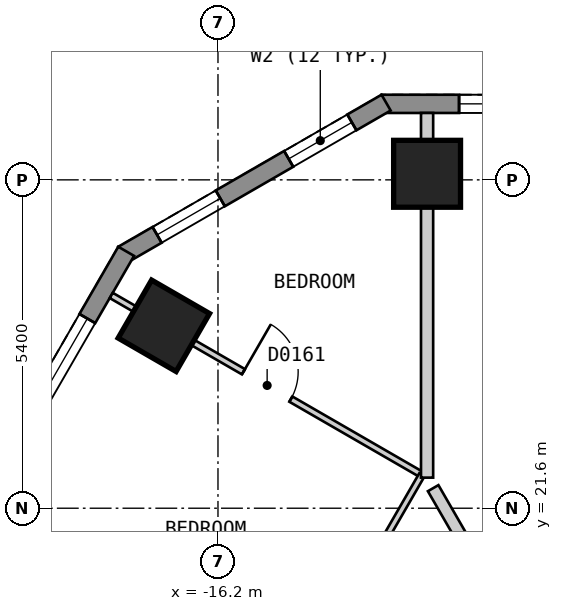
"""IFC4 building model, lengths in metres.
Left out: names, types, materials, properties, quantities, classifications, styles, units other than length and angle.
Written with IfcOpenShell. Run it as: python <this file> out.ifc"""

import sys

from ifc_helpers import new_model, si_unit, direction, frame, frame_2d, origin, origin_2d, place, context, subcontext, project, spatial, polyline, rectangle, outline, extrude, element, fill, save


model = new_model("IFC4")
c1 = context("Model", 3, precision=1e-05, world=origin(), true_north=direction((0.0, 1.0)))
c2 = subcontext(c1, "Body", "Model", "MODEL_VIEW")
j1 = project(units=[si_unit("LENGTHUNIT", "METRE"), si_unit("PLANEANGLEUNIT", "RADIAN")], contexts=[c1])
p1 = place(None, origin())
s1 = spatial("IfcSite", under=j1, at=p1, CompositionType="ELEMENT")
p2 = place(p1, origin())
s2 = spatial("IfcBuilding", under=s1, at=p2, CompositionType="ELEMENT")
p3 = place(p2, frame((0.0, 0.0, 23.4)))
s3 = spatial("IfcBuildingStorey", under=s2, at=p3, CompositionType="ELEMENT", Elevation=23.4)
for number, where, z_axis, x_axis in (
    (1, (-12.761, 27.1, 0.0), (0.0, 0.0, 1.0), (-1.0, 0.0, 0.0)),
    (2, (-17.09, 24.6, 0.0), (0.0, 0.0, 1.0), (-0.5, -0.866, 0.0)),
):
    element("IfcColumn", number, at=place(p3, frame(where, z_axis=z_axis, x_axis=x_axis)), inside=s3, PredefinedType="COLUMN", context=c2, shape_type="SweptSolid", body=[
        extrude(rectangle(XDim=1.1, YDim=1.1, at=origin_2d()), origin(), (0.0, 0.0, 1.0), 3.0),
    ])
p4 = place(p3, frame((13.51, 28.25, 0.0), z_axis=(0.0, 0.0, 1.0), x_axis=(-1.0, 0.0, 0.0)))
e3 = element("IfcWall", 3, at=p4, inside=s3, PredefinedType="SOLIDWALL", context=c2, shape_type="SweptSolid", body=[
    extrude(outline(polyline([(0.0, -0.15), (27.02, -0.15), (26.94, 0.15), (0.08, 0.15), (0.0, -0.15)])), origin(), (0.0, 0.0, 1.0), 2.7),
])
p5 = place(p4, frame((1.277, 0.0, 0.15)))
e4 = element("IfcOpeningElement", 4, at=p5, cuts=e3, PredefinedType="OPENING", context=c2, shape_type="SweptSolid", body=[
    extrude(rectangle(XDim=1.5, YDim=2.1, at=frame_2d((0.75, 1.05))), frame((0.0, 0.16, 0.0), z_axis=(0.0, -1.0, 0.0), x_axis=(1.0, 0.0, 0.0)), (0.0, 0.0, 1.0), 0.32),
])
p6 = place(p4, frame((3.829, 0.0, 0.15)))
e5 = element("IfcOpeningElement", 5, at=p6, cuts=e3, PredefinedType="OPENING", context=c2, shape_type="SweptSolid", body=[
    extrude(rectangle(XDim=1.5, YDim=2.1, at=frame_2d((0.75, 1.05))), frame((0.0, 0.16, 0.0), z_axis=(0.0, -1.0, 0.0), x_axis=(1.0, 0.0, 0.0)), (0.0, 0.0, 1.0), 0.32),
])
p7 = place(p4, frame((6.381, 0.0, 0.15)))
e6 = element("IfcOpeningElement", 6, at=p7, cuts=e3, PredefinedType="OPENING", context=c2, shape_type="SweptSolid", body=[
    extrude(rectangle(XDim=1.5, YDim=2.1, at=frame_2d((0.75, 1.05))), frame((0.0, 0.16, 0.0), z_axis=(0.0, -1.0, 0.0), x_axis=(1.0, 0.0, 0.0)), (0.0, 0.0, 1.0), 0.32),
])
p8 = place(p4, frame((8.933, 0.0, 0.15)))
e7 = element("IfcOpeningElement", 7, at=p8, cuts=e3, PredefinedType="OPENING", context=c2, shape_type="SweptSolid", body=[
    extrude(rectangle(XDim=1.5, YDim=2.1, at=frame_2d((0.75, 1.05))), frame((0.0, 0.16, 0.0), z_axis=(0.0, -1.0, 0.0), x_axis=(1.0, 0.0, 0.0)), (0.0, 0.0, 1.0), 0.32),
])
p9 = place(p4, frame((11.485, 0.0, 0.15)))
e8 = element("IfcOpeningElement", 8, at=p9, cuts=e3, PredefinedType="OPENING", context=c2, shape_type="SweptSolid", body=[
    extrude(rectangle(XDim=1.5, YDim=2.1, at=frame_2d((0.75, 1.05))), frame((0.0, 0.16, 0.0), z_axis=(0.0, -1.0, 0.0), x_axis=(1.0, 0.0, 0.0)), (0.0, 0.0, 1.0), 0.32),
])
p10 = place(p4, frame((14.037, 0.0, 0.15)))
e9 = element("IfcOpeningElement", 9, at=p10, cuts=e3, PredefinedType="OPENING", context=c2, shape_type="SweptSolid", body=[
    extrude(rectangle(XDim=1.5, YDim=2.1, at=frame_2d((0.75, 1.05))), frame((0.0, 0.16, 0.0), z_axis=(0.0, -1.0, 0.0), x_axis=(1.0, 0.0, 0.0)), (0.0, 0.0, 1.0), 0.32),
])
p11 = place(p4, frame((16.589, 0.0, 0.15)))
e10 = element("IfcOpeningElement", 10, at=p11, cuts=e3, PredefinedType="OPENING", context=c2, shape_type="SweptSolid", body=[
    extrude(rectangle(XDim=1.5, YDim=2.1, at=frame_2d((0.75, 1.05))), frame((0.0, 0.16, 0.0), z_axis=(0.0, -1.0, 0.0), x_axis=(1.0, 0.0, 0.0)), (0.0, 0.0, 1.0), 0.32),
])
p12 = place(p4, frame((19.141, 0.0, 0.15)))
e11 = element("IfcOpeningElement", 11, at=p12, cuts=e3, PredefinedType="OPENING", context=c2, shape_type="SweptSolid", body=[
    extrude(rectangle(XDim=1.5, YDim=2.1, at=frame_2d((0.75, 1.05))), frame((0.0, 0.16, 0.0), z_axis=(0.0, -1.0, 0.0), x_axis=(1.0, 0.0, 0.0)), (0.0, 0.0, 1.0), 0.32),
])
p13 = place(p4, frame((21.693, 0.0, 0.15)))
e12 = element("IfcOpeningElement", 12, at=p13, cuts=e3, PredefinedType="OPENING", context=c2, shape_type="SweptSolid", body=[
    extrude(rectangle(XDim=1.5, YDim=2.1, at=frame_2d((0.75, 1.05))), frame((0.0, 0.16, 0.0), z_axis=(0.0, -1.0, 0.0), x_axis=(1.0, 0.0, 0.0)), (0.0, 0.0, 1.0), 0.32),
])
p14 = place(p4, frame((24.245, 0.0, 0.15)))
e13 = element("IfcOpeningElement", 13, at=p14, cuts=e3, PredefinedType="OPENING", context=c2, shape_type="SweptSolid", body=[
    extrude(rectangle(XDim=1.5, YDim=2.1, at=frame_2d((0.75, 1.05))), frame((0.0, 0.16, 0.0), z_axis=(0.0, -1.0, 0.0), x_axis=(1.0, 0.0, 0.0)), (0.0, 0.0, 1.0), 0.32),
])
p15 = place(p3, frame((-13.435, 28.27, 0.0), z_axis=(0.0, 0.0, 1.0), x_axis=(-0.866010750942, -0.50002537861, 0.0)))
e14 = element("IfcWall", 14, at=p15, inside=s3, PredefinedType="SOLIDWALL", context=c2, shape_type="SweptSolid", body=[
    extrude(outline(polyline([(0.0, -0.15), (5.0, -0.15), (4.919, 0.15), (0.08, 0.15), (0.0, -0.15)])), origin(), (0.0, 0.0, 1.0), 2.7),
])
p16 = place(p15, frame((0.65, 0.0, 0.15)))
e15 = element("IfcOpeningElement", 15, at=p16, cuts=e14, PredefinedType="OPENING", context=c2, shape_type="SweptSolid", body=[
    extrude(rectangle(XDim=1.2, YDim=2.1, at=frame_2d((0.6, 1.05))), frame((0.0, 0.16, 0.0), z_axis=(0.0, -1.0, 0.0), x_axis=(1.0, 0.0, 0.0)), (0.0, 0.0, 1.0), 0.32),
])
p17 = place(p15, frame((3.149, 0.0, 0.15)))
e16 = element("IfcOpeningElement", 16, at=p17, cuts=e14, PredefinedType="OPENING", context=c2, shape_type="SweptSolid", body=[
    extrude(rectangle(XDim=1.2, YDim=2.1, at=frame_2d((0.6, 1.05))), frame((0.0, 0.16, 0.0), z_axis=(0.0, -1.0, 0.0), x_axis=(1.0, 0.0, 0.0)), (0.0, 0.0, 1.0), 0.32),
])
p18 = place(p3, frame((-17.71, 25.825, 0.0), z_axis=(0.0, 0.0, 1.0), x_axis=(-0.500001938803, -0.866024284413, 0.0)))
e17 = element("IfcWall", 17, at=p18, inside=s3, PredefinedType="SOLIDWALL", context=c2, shape_type="SweptSolid", body=[
    extrude(outline(polyline([(0.0, -0.15), (27.02, -0.15), (26.94, 0.15), (0.08, 0.15), (0.0, -0.15)])), origin(), (0.0, 0.0, 1.0), 2.7),
])
p19 = place(p18, frame((1.277, 0.0, 0.15)))
e18 = element("IfcOpeningElement", 18, at=p19, cuts=e17, PredefinedType="OPENING", context=c2, shape_type="SweptSolid", body=[
    extrude(rectangle(XDim=1.5, YDim=2.1, at=frame_2d((0.75, 1.05))), frame((0.0, 0.16, 0.0), z_axis=(0.0, -1.0, 0.0), x_axis=(1.0, 0.0, 0.0)), (0.0, 0.0, 1.0), 0.32),
])
p20 = place(p18, frame((3.829, 0.0, 0.15)))
e19 = element("IfcOpeningElement", 19, at=p20, cuts=e17, PredefinedType="OPENING", context=c2, shape_type="SweptSolid", body=[
    extrude(rectangle(XDim=1.5, YDim=2.1, at=frame_2d((0.75, 1.05))), frame((0.0, 0.16, 0.0), z_axis=(0.0, -1.0, 0.0), x_axis=(1.0, 0.0, 0.0)), (0.0, 0.0, 1.0), 0.32),
])
p21 = place(p18, frame((6.382, 0.0, 0.15)))
e20 = element("IfcOpeningElement", 20, at=p21, cuts=e17, PredefinedType="OPENING", context=c2, shape_type="SweptSolid", body=[
    extrude(rectangle(XDim=1.5, YDim=2.1, at=frame_2d((0.75, 1.05))), frame((0.0, 0.16, 0.0), z_axis=(0.0, -1.0, 0.0), x_axis=(1.0, 0.0, 0.0)), (0.0, 0.0, 1.0), 0.32),
])
p22 = place(p18, frame((8.933, 0.0, 0.15)))
e21 = element("IfcOpeningElement", 21, at=p22, cuts=e17, PredefinedType="OPENING", context=c2, shape_type="SweptSolid", body=[
    extrude(rectangle(XDim=1.5, YDim=2.1, at=frame_2d((0.75, 1.05))), frame((0.0, 0.16, 0.0), z_axis=(0.0, -1.0, 0.0), x_axis=(1.0, 0.0, 0.0)), (0.0, 0.0, 1.0), 0.32),
])
p23 = place(p18, frame((11.485, 0.0, 0.15)))
e22 = element("IfcOpeningElement", 22, at=p23, cuts=e17, PredefinedType="OPENING", context=c2, shape_type="SweptSolid", body=[
    extrude(rectangle(XDim=1.5, YDim=2.1, at=frame_2d((0.75, 1.05))), frame((0.0, 0.16, 0.0), z_axis=(0.0, -1.0, 0.0), x_axis=(1.0, 0.0, 0.0)), (0.0, 0.0, 1.0), 0.32),
])
p24 = place(p18, frame((14.037, 0.0, 0.15)))
e23 = element("IfcOpeningElement", 23, at=p24, cuts=e17, PredefinedType="OPENING", context=c2, shape_type="SweptSolid", body=[
    extrude(rectangle(XDim=1.5, YDim=2.1, at=frame_2d((0.75, 1.05))), frame((0.0, 0.16, 0.0), z_axis=(0.0, -1.0, 0.0), x_axis=(1.0, 0.0, 0.0)), (0.0, 0.0, 1.0), 0.32),
])
p25 = place(p18, frame((16.589, 0.0, 0.15)))
e24 = element("IfcOpeningElement", 24, at=p25, cuts=e17, PredefinedType="OPENING", context=c2, shape_type="SweptSolid", body=[
    extrude(rectangle(XDim=1.5, YDim=2.1, at=frame_2d((0.75, 1.05))), frame((0.0, 0.16, 0.0), z_axis=(0.0, -1.0, 0.0), x_axis=(1.0, 0.0, 0.0)), (0.0, 0.0, 1.0), 0.32),
])
p26 = place(p18, frame((19.141, 0.0, 0.15)))
e25 = element("IfcOpeningElement", 25, at=p26, cuts=e17, PredefinedType="OPENING", context=c2, shape_type="SweptSolid", body=[
    extrude(rectangle(XDim=1.5, YDim=2.1, at=frame_2d((0.75, 1.05))), frame((0.0, 0.16, 0.0), z_axis=(0.0, -1.0, 0.0), x_axis=(1.0, 0.0, 0.0)), (0.0, 0.0, 1.0), 0.32),
])
p27 = place(p18, frame((21.693, 0.0, 0.15)))
e26 = element("IfcOpeningElement", 26, at=p27, cuts=e17, PredefinedType="OPENING", context=c2, shape_type="SweptSolid", body=[
    extrude(rectangle(XDim=1.5, YDim=2.1, at=frame_2d((0.75, 1.05))), frame((0.0, 0.16, 0.0), z_axis=(0.0, -1.0, 0.0), x_axis=(1.0, 0.0, 0.0)), (0.0, 0.0, 1.0), 0.32),
])
p28 = place(p18, frame((24.244, 0.0, 0.15)))
e27 = element("IfcOpeningElement", 27, at=p28, cuts=e17, PredefinedType="OPENING", context=c2, shape_type="SweptSolid", body=[
    extrude(rectangle(XDim=1.5, YDim=2.1, at=frame_2d((0.75, 1.05))), frame((0.0, 0.16, 0.0), z_axis=(0.0, -1.0, 0.0), x_axis=(1.0, 0.0, 0.0)), (0.0, 0.0, 1.0), 0.32),
])
p29 = place(p3, frame((-17.955, 25.099, 0.0), z_axis=(0.0, 0.0, 1.0), x_axis=(0.866069217599, -0.499924104568, 0.0)))
e28 = element("IfcWall", 28, at=p29, inside=s3, PredefinedType="PARTITIONING", context=c2, shape_type="SweptSolid", body=[
    extrude(rectangle(XDim=5.869, YDim=0.1, at=frame_2d((2.935, 0.0))), origin(), (0.0, 0.0, 1.0), 2.7),
])
p30 = place(p29, frame((2.51, 0.0, 0.0)))
e29 = element("IfcOpeningElement", 29, at=p30, cuts=e28, PredefinedType="OPENING", context=c2, shape_type="SweptSolid", body=[
    extrude(rectangle(XDim=0.9, YDim=2.1, at=frame_2d((0.45, 1.05))), frame((0.0, 0.06, 0.0), z_axis=(0.0, -1.0, 0.0), x_axis=(1.0, 0.0, 0.0)), (0.0, 0.0, 1.0), 0.12),
])
p31 = place(p3, frame((-17.9, 13.395, 0.0), z_axis=(0.0, 0.0, 1.0), x_axis=(0.499949632511, 0.866054481515, 0.0)))
e30 = element("IfcWall", 30, at=p31, inside=s3, PredefinedType="PARTITIONING", context=c2, shape_type="SweptSolid", body=[
    extrude(rectangle(XDim=10.109, YDim=0.1, at=frame_2d((5.054, 0.0))), origin(), (0.0, 0.0, 1.0), 2.7),
])
p32 = place(p31, frame((2.002, 0.0, 0.0)))
e31 = element("IfcOpeningElement", 31, at=p32, cuts=e30, PredefinedType="OPENING", context=c2, shape_type="SweptSolid", body=[
    extrude(rectangle(XDim=0.9, YDim=2.1, at=frame_2d((0.45, 1.05))), frame((0.0, 0.06, 0.0), z_axis=(0.0, -1.0, 0.0), x_axis=(1.0, 0.0, 0.0)), (0.0, 0.0, 1.0), 0.12),
])
p33 = place(p31, frame((7.156, 0.0, 0.0)))
e32 = element("IfcOpeningElement", 32, at=p33, cuts=e30, PredefinedType="OPENING", context=c2, shape_type="SweptSolid", body=[
    extrude(rectangle(XDim=0.8, YDim=2.1, at=frame_2d((0.4, 1.05))), frame((0.0, 0.06, 0.0), z_axis=(0.0, -1.0, 0.0), x_axis=(1.0, 0.0, 0.0)), (0.0, 0.0, 1.0), 0.12),
])
p34 = place(p3, frame((-12.661, 21.93, 0.0), z_axis=(0.0, 0.0, 1.0), x_axis=(0.499975495332, -0.866039551099, 0.0)))
e33 = element("IfcWall", 33, at=p34, inside=s3, PredefinedType="PARTITIONING", context=c2, shape_type="SweptSolid", body=[
    extrude(rectangle(XDim=4.538, YDim=0.2, at=frame_2d((2.269, 0.0))), origin(), (0.0, 0.0, 1.0), 2.7),
])
p35 = place(p3, frame((-12.761, 22.103, 0.0), z_axis=(0.0, 0.0, 1.0), x_axis=(0.0, 1.0, 0.0)))
e34 = element("IfcWall", 34, at=p35, inside=s3, PredefinedType="PARTITIONING", context=c2, shape_type="SweptSolid", body=[
    extrude(rectangle(XDim=5.997, YDim=0.2, at=frame_2d((2.999, 0.0))), origin(), (0.0, 0.0, 1.0), 2.7),
])
p36 = place(p14, origin())
e35 = element("IfcWindow", 35, at=p36, inside=s3, PartitioningType="SINGLE_PANEL", PredefinedType="WINDOW", context=c2, shape_type="SweptSolid", body=[
    extrude(rectangle(XDim=1.5, YDim=2.1, at=frame_2d((0.75, 1.05))), frame((0.0, 0.03, 0.0), z_axis=(0.0, -1.0, 0.0), x_axis=(1.0, 0.0, 0.0)), (0.0, 0.0, 1.0), 0.06),
])
fill(e13, e35)
p37 = place(p16, origin())
e36 = element("IfcWindow", 36, at=p37, inside=s3, PartitioningType="SINGLE_PANEL", PredefinedType="WINDOW", context=c2, shape_type="SweptSolid", body=[
    extrude(rectangle(XDim=1.2, YDim=2.1, at=frame_2d((0.6, 1.05))), frame((0.0, 0.03, 0.0), z_axis=(0.0, -1.0, 0.0), x_axis=(1.0, 0.0, 0.0)), (0.0, 0.0, 1.0), 0.06),
])
fill(e15, e36)
p38 = place(p17, origin())
e37 = element("IfcWindow", 37, at=p38, inside=s3, PartitioningType="SINGLE_PANEL", PredefinedType="WINDOW", context=c2, shape_type="SweptSolid", body=[
    extrude(rectangle(XDim=1.2, YDim=2.1, at=frame_2d((0.6, 1.05))), frame((0.0, 0.03, 0.0), z_axis=(0.0, -1.0, 0.0), x_axis=(1.0, 0.0, 0.0)), (0.0, 0.0, 1.0), 0.06),
])
fill(e16, e37)
p39 = place(p19, origin())
e38 = element("IfcWindow", 38, at=p39, inside=s3, PartitioningType="SINGLE_PANEL", PredefinedType="WINDOW", context=c2, shape_type="SweptSolid", body=[
    extrude(rectangle(XDim=1.5, YDim=2.1, at=frame_2d((0.75, 1.05))), frame((0.0, 0.03, 0.0), z_axis=(0.0, -1.0, 0.0), x_axis=(1.0, 0.0, 0.0)), (0.0, 0.0, 1.0), 0.06),
])
fill(e18, e38)
p40 = place(p30, origin())
e39 = element("IfcDoor", 39, at=p40, inside=s3, OperationType="SINGLE_SWING_LEFT", PredefinedType="DOOR", context=c2, shape_type="SweptSolid", body=[
    extrude(rectangle(XDim=0.9, YDim=2.1, at=frame_2d((0.45, 1.05))), frame((0.0, 0.025, 0.0), z_axis=(0.0, -1.0, 0.0), x_axis=(1.0, 0.0, 0.0)), (0.0, 0.0, 1.0), 0.05),
])
fill(e29, e39)
save(model, sys.argv[1])
